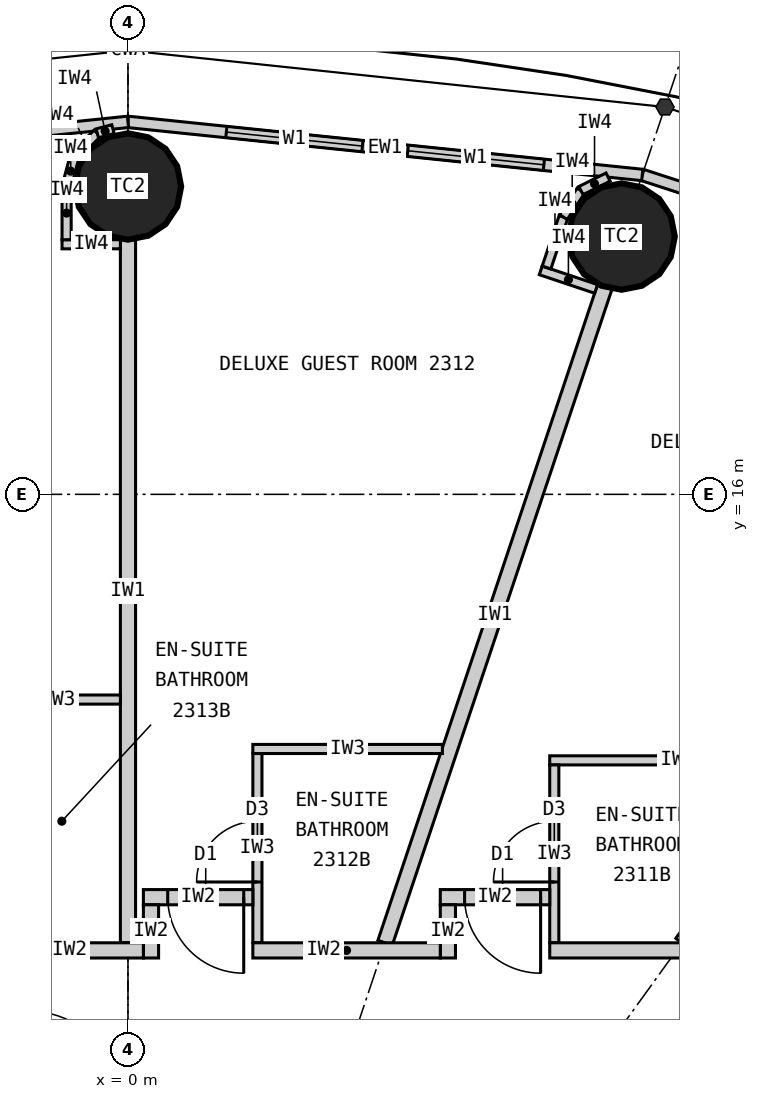
"""IFC4 building model, lengths in metres.
Left out: names, types, materials, properties, quantities, classifications, styles, units other than length and angle.
Written with IfcOpenShell. Run it as: python <this file> out.ifc"""

import sys

from ifc_helpers import new_model, si_unit, direction, frame, frame_2d, origin, origin_2d, place, context, subcontext, project, spatial, rectangle, circle, extrude, clip, halfspace, element, fill, save


model = new_model("IFC4")
c1 = context("Model", 3, precision=1e-05, world=origin(), true_north=direction((0.0, 1.0)))
c2 = subcontext(c1, "Body", "Model", "MODEL_VIEW")
j1 = project(units=[si_unit("LENGTHUNIT", "METRE"), si_unit("PLANEANGLEUNIT", "RADIAN")], contexts=[c1])
p1 = place(None, origin())
s1 = spatial("IfcSite", under=j1, at=p1, CompositionType="ELEMENT")
p2 = place(p1, origin())
s2 = spatial("IfcBuilding", under=s1, at=p2, CompositionType="ELEMENT")
p3 = place(p2, frame((0.0, 0.0, 90.3)))
s3 = spatial("IfcBuildingStorey", under=s2, at=p3, CompositionType="ELEMENT", Elevation=90.3)
for number, where, z_axis, x_axis in (
    (1, (6.495, 19.391, 0.0), (0.0, 0.0, 1.0), (1.0, 0.0, 0.0)),
    (2, (0.0, 20.05, 0.0), (0.0, 0.0, 1.0), (1.0, 0.0, 0.0)),
):
    element("IfcColumn", number, at=place(p3, frame(where, z_axis=z_axis, x_axis=x_axis)), inside=s3, PredefinedType="COLUMN", context=c2, shape_type="Clipping", body=[
        clip(extrude(circle(Radius=0.7, at=origin_2d()), origin(), (0.0, 0.0, 1.0), 3.3), halfspace(frame((0.0, 0.0, 2.25), z_axis=(0.0, 0.0, 1.0), x_axis=(1.0, 0.0, 0.0)), False)),
    ])
p4 = place(p3, frame((13.096, 18.147, 0.0), z_axis=(0.0, 0.0, 1.0), x_axis=(-0.951137534625, 0.308767534285, 0.0)))
e3 = element("IfcWall", 3, at=p4, inside=s3, PredefinedType="ELEMENTEDWALL", context=c2, shape_type="SweptSolid", body=[
    extrude(rectangle(XDim=6.655, YDim=0.15, at=frame_2d((3.328, 0.0))), origin(), (0.0, 0.0, 1.0), 3.05),
])
p5 = place(p4, frame((1.228, 0.0, 0.9)))
e4 = element("IfcOpeningElement", 4, at=p5, cuts=e3, PredefinedType="OPENING", context=c2, shape_type="SweptSolid", body=[
    extrude(rectangle(XDim=1.8, YDim=1.9, at=frame_2d((0.9, 0.95))), frame((0.0, 0.085, 0.0), z_axis=(0.0, -1.0, 0.0), x_axis=(1.0, 0.0, 0.0)), (0.0, 0.0, 1.0), 0.17),
])
p6 = place(p4, frame((3.628, 0.0, 0.9)))
e5 = element("IfcOpeningElement", 5, at=p6, cuts=e3, PredefinedType="OPENING", context=c2, shape_type="SweptSolid", body=[
    extrude(rectangle(XDim=1.8, YDim=1.9, at=frame_2d((0.9, 0.95))), frame((0.0, 0.085, 0.0), z_axis=(0.0, -1.0, 0.0), x_axis=(1.0, 0.0, 0.0)), (0.0, 0.0, 1.0), 0.17),
])
p7 = place(p3, frame((6.766, 20.202, 0.0), z_axis=(0.0, 0.0, 1.0), x_axis=(-0.994721394369, 0.102612609291, 0.0)))
e6 = element("IfcWall", 6, at=p7, inside=s3, PredefinedType="ELEMENTEDWALL", context=c2, shape_type="SweptSolid", body=[
    extrude(rectangle(XDim=6.802, YDim=0.15, at=frame_2d((3.401, 0.0))), origin(), (0.0, 0.0, 1.0), 3.05),
])
p8 = place(p7, frame((1.301, 0.0, 0.9)))
e7 = element("IfcOpeningElement", 7, at=p8, cuts=e6, PredefinedType="OPENING", context=c2, shape_type="SweptSolid", body=[
    extrude(rectangle(XDim=1.8, YDim=1.9, at=frame_2d((0.9, 0.95))), frame((0.0, 0.085, 0.0), z_axis=(0.0, -1.0, 0.0), x_axis=(1.0, 0.0, 0.0)), (0.0, 0.0, 1.0), 0.17),
])
p9 = place(p7, frame((3.701, 0.0, 0.9)))
e8 = element("IfcOpeningElement", 8, at=p9, cuts=e6, PredefinedType="OPENING", context=c2, shape_type="SweptSolid", body=[
    extrude(rectangle(XDim=1.8, YDim=1.9, at=frame_2d((0.9, 0.95))), frame((0.0, 0.085, 0.0), z_axis=(0.0, -1.0, 0.0), x_axis=(1.0, 0.0, 0.0)), (0.0, 0.0, 1.0), 0.17),
])
p10 = place(p3, frame((0.0, 20.9, 0.0), z_axis=(0.0, 0.0, 1.0), x_axis=(-0.994721394369, -0.102612609291, 0.0)))
e9 = element("IfcWall", 9, at=p10, inside=s3, PredefinedType="ELEMENTEDWALL", context=c2, shape_type="SweptSolid", body=[
    extrude(rectangle(XDim=6.802, YDim=0.15, at=frame_2d((3.401, 0.0))), origin(), (0.0, 0.0, 1.0), 3.05),
])
p11 = place(p10, frame((1.301, 0.0, 0.9)))
e10 = element("IfcOpeningElement", 10, at=p11, cuts=e9, PredefinedType="OPENING", context=c2, shape_type="SweptSolid", body=[
    extrude(rectangle(XDim=1.8, YDim=1.9, at=frame_2d((0.9, 0.95))), frame((0.0, 0.085, 0.0), z_axis=(0.0, -1.0, 0.0), x_axis=(1.0, 0.0, 0.0)), (0.0, 0.0, 1.0), 0.17),
])
p12 = place(p10, frame((3.701, 0.0, 0.9)))
e11 = element("IfcOpeningElement", 11, at=p12, cuts=e9, PredefinedType="OPENING", context=c2, shape_type="SweptSolid", body=[
    extrude(rectangle(XDim=1.8, YDim=1.9, at=frame_2d((0.9, 0.95))), frame((0.0, 0.085, 0.0), z_axis=(0.0, -1.0, 0.0), x_axis=(1.0, 0.0, 0.0)), (0.0, 0.0, 1.0), 0.17),
])
p13 = place(p3, frame((7.289, 10.1, 0.0), z_axis=(0.0, 0.0, 1.0), x_axis=(0.585198353053, 0.810890182197, 0.0)))
e12 = element("IfcWall", 12, at=p13, inside=s3, PredefinedType="PARTITIONING", context=c2, shape_type="SweptSolid", body=[
    extrude(rectangle(XDim=8.36, YDim=0.2, at=frame_2d((4.18, 0.0))), origin(), (0.0, 0.0, 1.0), 2.15),
])
p14 = place(p3, frame((3.383, 10.1, 0.0), z_axis=(0.0, 0.0, 1.0), x_axis=(0.31759592231, 0.948226149256, 0.0)))
e13 = element("IfcWall", 13, at=p14, inside=s3, PredefinedType="PARTITIONING", context=c2, shape_type="SweptSolid", body=[
    extrude(rectangle(XDim=9.098, YDim=0.2, at=frame_2d((4.549, 0.0))), origin(), (0.0, 0.0, 1.0), 2.15),
])
p15 = place(p3, frame((0.0, 10.1, 0.0), z_axis=(0.0, 0.0, 1.0), x_axis=(0.0, 1.0, 0.0)))
e14 = element("IfcWall", 14, at=p15, inside=s3, PredefinedType="PARTITIONING", context=c2, shape_type="SweptSolid", body=[
    extrude(rectangle(XDim=9.25, YDim=0.2, at=frame_2d((4.625, 0.0))), origin(), (0.0, 0.0, 1.0), 2.25),
])
p16 = place(p3, frame((8.921, 12.5, 0.0), z_axis=(0.0, 0.0, 1.0), x_axis=(-1.0, 0.0, 0.0)))
e15 = element("IfcWall", 15, at=p16, inside=s3, PredefinedType="PARTITIONING", context=c2, shape_type="SweptSolid", body=[
    extrude(rectangle(XDim=3.372, YDim=0.12, at=frame_2d((1.686, 0.0))), origin(), (0.0, 0.0, 1.0), 3.05),
])
p17 = place(p3, frame((5.609, 10.1, 0.0), z_axis=(0.0, 0.0, 1.0), x_axis=(0.0, 1.0, 0.0)))
e16 = element("IfcWall", 16, at=p17, inside=s3, PredefinedType="PARTITIONING", context=c2, shape_type="SweptSolid", body=[
    extrude(rectangle(XDim=2.34, YDim=0.12, at=frame_2d((1.17, 0.0))), origin(), (0.0, 0.0, 1.0), 3.05),
])
p18 = place(p17, frame((0.8, 0.0, 0.0)))
e17 = element("IfcOpeningElement", 17, at=p18, cuts=e16, PredefinedType="OPENING", context=c2, shape_type="SweptSolid", body=[
    extrude(rectangle(XDim=0.8, YDim=2.1, at=frame_2d((0.4, 1.05))), frame((0.0, 0.07, 0.0), z_axis=(0.0, -1.0, 0.0), x_axis=(1.0, 0.0, 0.0)), (0.0, 0.0, 1.0), 0.14),
])
p19 = place(p3, frame((4.137, 12.65, 0.0), z_axis=(0.0, 0.0, 1.0), x_axis=(-1.0, 0.0, 0.0)))
e18 = element("IfcWall", 18, at=p19, inside=s3, PredefinedType="PARTITIONING", context=c2, shape_type="SweptSolid", body=[
    extrude(rectangle(XDim=2.494, YDim=0.12, at=frame_2d((1.247, 0.0))), origin(), (0.0, 0.0, 1.0), 3.05),
])
p20 = place(p3, frame((1.703, 10.1, 0.0), z_axis=(0.0, 0.0, 1.0), x_axis=(0.0, 1.0, 0.0)))
e19 = element("IfcWall", 19, at=p20, inside=s3, PredefinedType="PARTITIONING", context=c2, shape_type="SweptSolid", body=[
    extrude(rectangle(XDim=2.49, YDim=0.12, at=frame_2d((1.245, 0.0))), origin(), (0.0, 0.0, 1.0), 3.05),
])
p21 = place(p20, frame((0.8, 0.0, 0.0)))
e20 = element("IfcOpeningElement", 20, at=p21, cuts=e19, PredefinedType="OPENING", context=c2, shape_type="SweptSolid", body=[
    extrude(rectangle(XDim=0.8, YDim=2.1, at=frame_2d((0.4, 1.05))), frame((0.0, 0.07, 0.0), z_axis=(0.0, -1.0, 0.0), x_axis=(1.0, 0.0, 0.0)), (0.0, 0.0, 1.0), 0.14),
])
p22 = place(p3, frame((-0.1, 13.3, 0.0), z_axis=(0.0, 0.0, 1.0), x_axis=(-1.0, 0.0, 0.0)))
e21 = element("IfcWall", 21, at=p22, inside=s3, PredefinedType="PARTITIONING", context=c2, shape_type="SweptSolid", body=[
    extrude(rectangle(XDim=1.64, YDim=0.12, at=frame_2d((0.82, 0.0))), origin(), (0.0, 0.0, 1.0), 3.05),
])
p23 = place(p3, frame((4.109, 10.7, 0.0), z_axis=(0.0, 0.0, 1.0), x_axis=(1.0, 0.0, 0.0)))
e22 = element("IfcWall", 22, at=p23, inside=s3, PredefinedType="PARTITIONING", context=c2, shape_type="SweptSolid", body=[
    extrude(rectangle(XDim=1.44, YDim=0.2, at=frame_2d((0.72, 0.0))), origin(), (0.0, 0.0, 1.0), 3.05),
])
p24 = place(p23, frame((0.32, 0.0, 0.0)))
e23 = element("IfcOpeningElement", 23, at=p24, cuts=e22, PredefinedType="OPENING", context=c2, shape_type="SweptSolid", body=[
    extrude(rectangle(XDim=1.0, YDim=2.2, at=frame_2d((0.5, 1.1))), frame((0.0, 0.11, 0.0), z_axis=(0.0, -1.0, 0.0), x_axis=(1.0, 0.0, 0.0)), (0.0, 0.0, 1.0), 0.22),
])
p25 = place(p3, frame((4.209, 9.9, 0.0), z_axis=(0.0, 0.0, 1.0), x_axis=(0.0, 1.0, 0.0)))
e24 = element("IfcWall", 24, at=p25, inside=s3, PredefinedType="PARTITIONING", context=c2, shape_type="SweptSolid", body=[
    extrude(rectangle(XDim=0.7, YDim=0.2, at=frame_2d((0.35, 0.0))), origin(), (0.0, 0.0, 1.0), 3.05),
])
p26 = place(p3, frame((0.203, 10.7, 0.0), z_axis=(0.0, 0.0, 1.0), x_axis=(1.0, 0.0, 0.0)))
e25 = element("IfcWall", 25, at=p26, inside=s3, PredefinedType="PARTITIONING", context=c2, shape_type="SweptSolid", body=[
    extrude(rectangle(XDim=1.44, YDim=0.2, at=frame_2d((0.72, 0.0))), origin(), (0.0, 0.0, 1.0), 3.05),
])
p27 = place(p26, frame((0.32, 0.0, 0.0)))
e26 = element("IfcOpeningElement", 26, at=p27, cuts=e25, PredefinedType="OPENING", context=c2, shape_type="SweptSolid", body=[
    extrude(rectangle(XDim=1.0, YDim=2.2, at=frame_2d((0.5, 1.1))), frame((0.0, 0.11, 0.0), z_axis=(0.0, -1.0, 0.0), x_axis=(1.0, 0.0, 0.0)), (0.0, 0.0, 1.0), 0.22),
])
p28 = place(p3, frame((0.303, 9.9, 0.0), z_axis=(0.0, 0.0, 1.0), x_axis=(0.0, 1.0, 0.0)))
e27 = element("IfcWall", 27, at=p28, inside=s3, PredefinedType="PARTITIONING", context=c2, shape_type="SweptSolid", body=[
    extrude(rectangle(XDim=0.7, YDim=0.2, at=frame_2d((0.35, 0.0))), origin(), (0.0, 0.0, 1.0), 3.05),
])
p29 = place(p3, frame((-1.74, 10.0, 0.0), z_axis=(0.0, 0.0, 1.0), x_axis=(1.0, 0.0, 0.0)))
e28 = element("IfcWall", 28, at=p29, inside=s3, PredefinedType="PARTITIONING", context=c2, shape_type="SweptSolid", body=[
    extrude(rectangle(XDim=1.943, YDim=0.2, at=frame_2d((0.971, 0.0))), origin(), (0.0, 0.0, 1.0), 3.05),
])
p30 = place(p3, frame((1.643, 10.0, 0.0), z_axis=(0.0, 0.0, 1.0), x_axis=(1.0, 0.0, 0.0)))
e29 = element("IfcWall", 29, at=p30, inside=s3, PredefinedType="PARTITIONING", context=c2, shape_type="SweptSolid", body=[
    extrude(rectangle(XDim=2.466, YDim=0.2, at=frame_2d((1.233, 0.0))), origin(), (0.0, 0.0, 1.0), 3.05),
])
p31 = place(p3, frame((5.549, 10.0, 0.0), z_axis=(0.0, 0.0, 1.0), x_axis=(1.0, 0.0, 0.0)))
e30 = element("IfcWall", 30, at=p31, inside=s3, PredefinedType="PARTITIONING", context=c2, shape_type="SweptSolid", body=[
    extrude(rectangle(XDim=3.896, YDim=0.2, at=frame_2d((1.948, 0.0))), origin(), (0.0, 0.0, 1.0), 3.05),
])
p32 = place(p3, frame((6.159, 18.702, 0.0), z_axis=(0.0, 0.0, 1.0), x_axis=(-0.948173154049, 0.31775410295, 0.0)))
e31 = element("IfcWall", 31, at=p32, inside=s3, PredefinedType="PARTITIONING", context=c2, shape_type="SweptSolid", body=[
    extrude(rectangle(XDim=0.768, YDim=0.12, at=frame_2d((0.384, 0.0))), origin(), (0.0, 0.0, 1.0), 3.05),
])
p33 = place(p3, frame((5.507, 18.984, 0.0), z_axis=(0.0, 0.0, 1.0), x_axis=(0.317692050622, 0.948193946918, 0.0)))
e32 = element("IfcWall", 32, at=p33, inside=s3, PredefinedType="PARTITIONING", context=c2, shape_type="SweptSolid", body=[
    extrude(rectangle(XDim=0.7, YDim=0.12, at=frame_2d((0.35, 0.0))), origin(), (0.0, 0.0, 1.0), 3.05),
])
p34 = place(p3, frame((5.729, 19.648, 0.0), z_axis=(0.0, 0.0, 1.0), x_axis=(0.552135764955, 0.833754218615, 0.0)))
e33 = element("IfcWall", 33, at=p34, inside=s3, PredefinedType="PARTITIONING", context=c2, shape_type="SweptSolid", body=[
    extrude(rectangle(XDim=0.418, YDim=0.12, at=frame_2d((0.209, 0.0))), origin(), (0.0, 0.0, 1.0), 3.05),
])
p35 = place(p3, frame((5.96, 19.996, 0.0), z_axis=(0.0, 0.0, 1.0), x_axis=(0.895160725913, 0.445743507842, 0.0)))
e34 = element("IfcWall", 34, at=p35, inside=s3, PredefinedType="PARTITIONING", context=c2, shape_type="SweptSolid", body=[
    extrude(rectangle(XDim=0.399, YDim=0.12, at=frame_2d((0.199, 0.0))), origin(), (0.0, 0.0, 1.0), 3.05),
])
p36 = place(p3, frame((-0.1, 19.29, 0.0), z_axis=(0.0, 0.0, 1.0), x_axis=(-1.0, 0.0, 0.0)))
e35 = element("IfcWall", 35, at=p36, inside=s3, PredefinedType="PARTITIONING", context=c2, shape_type="SweptSolid", body=[
    extrude(rectangle(XDim=0.767, YDim=0.12, at=frame_2d((0.384, 0.0))), origin(), (0.0, 0.0, 1.0), 3.05),
])
p37 = place(p3, frame((-0.808, 19.35, 0.0), z_axis=(0.0, 0.0, 1.0), x_axis=(0.0, 1.0, 0.0)))
e36 = element("IfcWall", 36, at=p37, inside=s3, PredefinedType="PARTITIONING", context=c2, shape_type="SweptSolid", body=[
    extrude(rectangle(XDim=0.7, YDim=0.12, at=frame_2d((0.35, 0.0))), origin(), (0.0, 0.0, 1.0), 3.05),
])
p38 = place(p3, frame((-0.808, 20.05, 0.0), z_axis=(0.0, 0.0, 1.0), x_axis=(0.2592614205, 0.965807183573, 0.0)))
e37 = element("IfcWall", 37, at=p38, inside=s3, PredefinedType="PARTITIONING", context=c2, shape_type="SweptSolid", body=[
    extrude(rectangle(XDim=0.418, YDim=0.12, at=frame_2d((0.209, 0.0))), origin(), (0.0, 0.0, 1.0), 3.05),
])
p39 = place(p3, frame((-0.699, 20.454, 0.0), z_axis=(0.0, 0.0, 1.0), x_axis=(0.707106781187, 0.707106781187, 0.0)))
e38 = element("IfcWall", 38, at=p39, inside=s3, PredefinedType="PARTITIONING", context=c2, shape_type="SweptSolid", body=[
    extrude(rectangle(XDim=0.418, YDim=0.12, at=frame_2d((0.209, 0.0))), origin(), (0.0, 0.0, 1.0), 3.05),
])
p40 = place(p3, frame((-0.404, 20.749, 0.0), z_axis=(0.0, 0.0, 1.0), x_axis=(0.965759066438, 0.25944060128, 0.0)))
e39 = element("IfcWall", 39, at=p40, inside=s3, PredefinedType="PARTITIONING", context=c2, shape_type="SweptSolid", body=[
    extrude(rectangle(XDim=0.214, YDim=0.12, at=frame_2d((0.107, 0.0))), origin(), (0.0, 0.0, 1.0), 3.05),
])
p41 = place(p8, origin())
e40 = element("IfcWindow", 40, at=p41, inside=s3, PartitioningType="SINGLE_PANEL", PredefinedType="WINDOW", context=c2, shape_type="SweptSolid", body=[
    extrude(rectangle(XDim=1.8, YDim=1.9, at=frame_2d((0.9, 0.95))), frame((0.0, 0.03, 0.0), z_axis=(0.0, -1.0, 0.0), x_axis=(1.0, 0.0, 0.0)), (0.0, 0.0, 1.0), 0.06),
])
fill(e7, e40)
p42 = place(p9, origin())
e41 = element("IfcWindow", 41, at=p42, inside=s3, PartitioningType="SINGLE_PANEL", PredefinedType="WINDOW", context=c2, shape_type="SweptSolid", body=[
    extrude(rectangle(XDim=1.8, YDim=1.9, at=frame_2d((0.9, 0.95))), frame((0.0, 0.03, 0.0), z_axis=(0.0, -1.0, 0.0), x_axis=(1.0, 0.0, 0.0)), (0.0, 0.0, 1.0), 0.06),
])
fill(e8, e41)
p43 = place(p18, origin())
e42 = element("IfcDoor", 42, at=p43, inside=s3, OperationType="SINGLE_SWING_LEFT", PredefinedType="DOOR", context=c2, shape_type="SweptSolid", body=[
    extrude(rectangle(XDim=0.8, YDim=2.1, at=frame_2d((0.4, 1.05))), frame((0.0, 0.025, 0.0), z_axis=(0.0, -1.0, 0.0), x_axis=(1.0, 0.0, 0.0)), (0.0, 0.0, 1.0), 0.05),
])
fill(e17, e42)
p44 = place(p24, origin())
e43 = element("IfcDoor", 43, at=p44, inside=s3, OperationType="SINGLE_SWING_RIGHT", PredefinedType="DOOR", context=c2, shape_type="SweptSolid", body=[
    extrude(rectangle(XDim=1.0, YDim=2.2, at=frame_2d((0.5, 1.1))), frame((0.0, 0.025, 0.0), z_axis=(0.0, -1.0, 0.0), x_axis=(1.0, 0.0, 0.0)), (0.0, 0.0, 1.0), 0.05),
])
fill(e23, e43)
p45 = place(p21, origin())
e44 = element("IfcDoor", 44, at=p45, inside=s3, OperationType="SINGLE_SWING_LEFT", PredefinedType="DOOR", context=c2, shape_type="SweptSolid", body=[
    extrude(rectangle(XDim=0.8, YDim=2.1, at=frame_2d((0.4, 1.05))), frame((0.0, 0.025, 0.0), z_axis=(0.0, -1.0, 0.0), x_axis=(1.0, 0.0, 0.0)), (0.0, 0.0, 1.0), 0.05),
])
fill(e20, e44)
p46 = place(p27, origin())
e45 = element("IfcDoor", 45, at=p46, inside=s3, OperationType="SINGLE_SWING_RIGHT", PredefinedType="DOOR", context=c2, shape_type="SweptSolid", body=[
    extrude(rectangle(XDim=1.0, YDim=2.2, at=frame_2d((0.5, 1.1))), frame((0.0, 0.025, 0.0), z_axis=(0.0, -1.0, 0.0), x_axis=(1.0, 0.0, 0.0)), (0.0, 0.0, 1.0), 0.05),
])
fill(e26, e45)
save(model, sys.argv[1])
